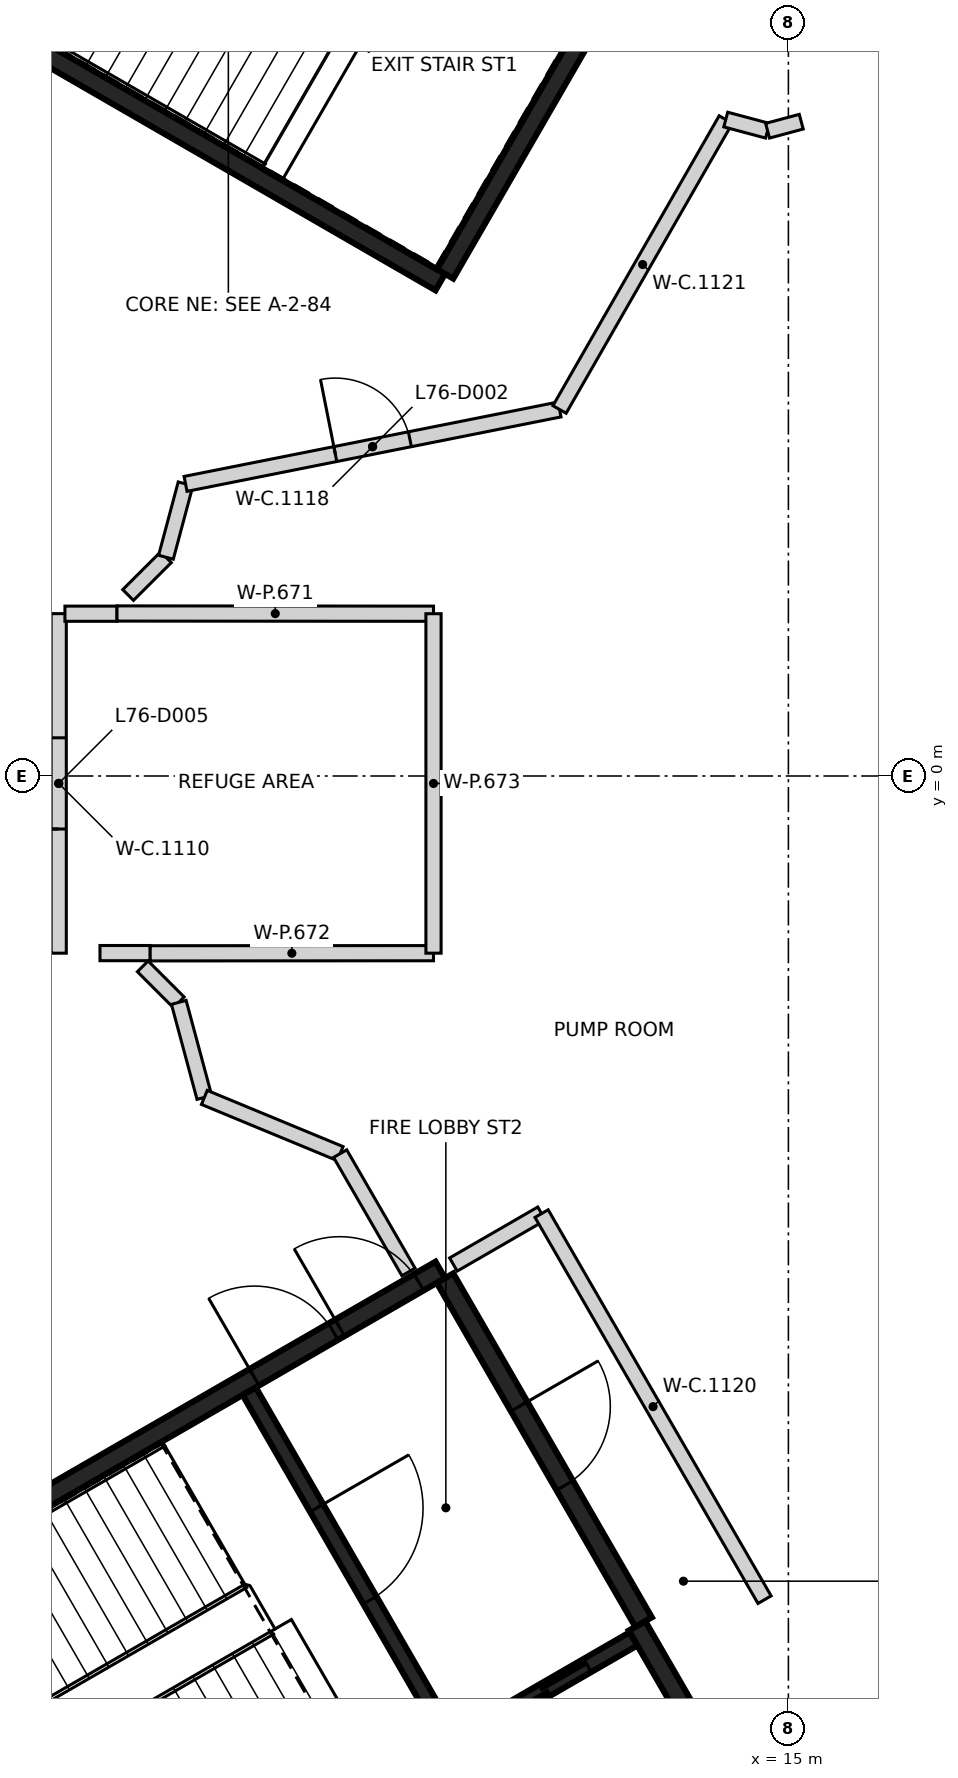
"""IFC4 building model, lengths in metres.
Left out: names, types, materials, properties, quantities, classifications, styles, units other than length and angle.
Written with IfcOpenShell. Run it as: python <this file> out.ifc"""

import sys

from ifc_helpers import new_model, si_unit, direction, frame, frame_2d, origin, place, context, subcontext, project, spatial, rectangle, extrude, element, fill, save


model = new_model("IFC4")
c1 = context("Model", 3, precision=1e-05, world=origin(), true_north=direction((0.0, 1.0)))
c2 = subcontext(c1, "Body", "Model", "MODEL_VIEW")
j1 = project(units=[si_unit("LENGTHUNIT", "METRE"), si_unit("PLANEANGLEUNIT", "RADIAN")], contexts=[c1])
p1 = place(None, origin())
s1 = spatial("IfcSite", under=j1, at=p1, CompositionType="ELEMENT")
p2 = place(p1, origin())
s2 = spatial("IfcBuilding", under=s1, at=p2, CompositionType="ELEMENT")
p3 = place(p2, frame((0.0, 0.0, 301.8)))
s3 = spatial("IfcBuildingStorey", under=s2, at=p3, CompositionType="ELEMENT", Elevation=301.8)
p4 = place(p3, frame((10.42, 6.498, 0.0), z_axis=(0.0, 0.0, 1.0), x_axis=(-0.866021906294, 0.500006057782, 0.0)))
e1 = element("IfcWall", 1, at=p4, inside=s3, PredefinedType="SHEAR", context=c2, shape_type="SweptSolid", body=[
    extrude(rectangle(XDim=11.55, YDim=0.25, at=frame_2d((5.775, 0.0))), origin(), (0.0, 0.0, 1.0), 4.45),
])
p5 = place(p4, frame((10.025, 0.0, 0.0)))
e2 = element("IfcOpeningElement", 2, at=p5, cuts=e1, PredefinedType="OPENING", context=c2, shape_type="SweptSolid", body=[
    extrude(rectangle(XDim=1.2, YDim=2.1, at=frame_2d((0.6, 1.05))), frame((0.0, 0.135, 0.0), z_axis=(0.0, -1.0, 0.0), x_axis=(1.0, 0.0, 0.0)), (0.0, 0.0, 1.0), 0.27),
])
p6 = place(p4, frame((8.725, 0.0, 0.0)))
e3 = element("IfcOpeningElement", 3, at=p6, cuts=e1, PredefinedType="OPENING", context=c2, shape_type="SweptSolid", body=[
    extrude(rectangle(XDim=1.2, YDim=2.1, at=frame_2d((0.6, 1.05))), frame((0.0, 0.135, 0.0), z_axis=(0.0, -1.0, 0.0), x_axis=(1.0, 0.0, 0.0)), (0.0, 0.0, 1.0), 0.27),
])
p7 = place(p3, frame((13.238, 11.378, 0.0), z_axis=(0.0, 0.0, 1.0), x_axis=(-0.500008851346, -0.866020293397, 0.0)))
e4 = element("IfcWall", 4, at=p7, inside=s3, PredefinedType="SHEAR", context=c2, shape_type="SweptSolid", body=[
    extrude(rectangle(XDim=5.51, YDim=0.25, at=frame_2d((2.755, 0.0))), origin(), (0.0, 0.0, 1.0), 4.45),
])
p8 = place(p3, frame((0.417, -12.273, 0.0), z_axis=(0.0, 0.0, 1.0), x_axis=(0.866021906294, 0.500006057782, 0.0)))
e5 = element("IfcWall", 5, at=p8, inside=s3, PredefinedType="SHEAR", context=c2, shape_type="SweptSolid", body=[
    extrude(rectangle(XDim=11.55, YDim=0.25, at=frame_2d((5.775, 0.0))), origin(), (0.0, 0.0, 1.0), 4.45),
])
p9 = place(p8, frame((10.025, 0.0, 0.0)))
e6 = element("IfcOpeningElement", 6, at=p9, cuts=e5, PredefinedType="OPENING", context=c2, shape_type="SweptSolid", body=[
    extrude(rectangle(XDim=1.2, YDim=2.1, at=frame_2d((0.6, 1.05))), frame((0.0, 0.135, 0.0), z_axis=(0.0, -1.0, 0.0), x_axis=(1.0, 0.0, 0.0)), (0.0, 0.0, 1.0), 0.27),
])
p10 = place(p8, frame((8.725, 0.0, 0.0)))
e7 = element("IfcOpeningElement", 7, at=p10, cuts=e5, PredefinedType="OPENING", context=c2, shape_type="SweptSolid", body=[
    extrude(rectangle(XDim=1.2, YDim=2.1, at=frame_2d((0.6, 1.05))), frame((0.0, 0.135, 0.0), z_axis=(0.0, -1.0, 0.0), x_axis=(1.0, 0.0, 0.0)), (0.0, 0.0, 1.0), 0.27),
])
p11 = place(p3, frame((13.008, -11.181, 0.0), z_axis=(0.0, 0.0, 1.0), x_axis=(0.500001955336, -0.866024274868, 0.0)))
e8 = element("IfcWall", 8, at=p11, inside=s3, PredefinedType="SHEAR", context=c2, shape_type="SweptSolid", body=[
    extrude(rectangle(XDim=6.125, YDim=0.25, at=frame_2d((3.062, 0.0))), origin(), (0.0, 0.0, 1.0), 4.45),
])
p12 = place(p11, frame((4.563, 0.0, 0.0)))
e9 = element("IfcOpeningElement", 9, at=p12, cuts=e8, PredefinedType="OPENING", context=c2, shape_type="SweptSolid", body=[
    extrude(rectangle(XDim=1.0, YDim=2.1, at=frame_2d((0.5, 1.05))), frame((0.0, 0.135, 0.0), z_axis=(0.0, -1.0, 0.0), x_axis=(1.0, 0.0, 0.0)), (0.0, 0.0, 1.0), 0.27),
])
p13 = place(p3, frame((10.483, -6.606, 0.0), z_axis=(0.0, 0.0, 1.0), x_axis=(0.49999885962, -0.866026062182, 0.0)))
e10 = element("IfcWall", 10, at=p13, inside=s3, PredefinedType="SHEAR", context=c2, shape_type="SweptSolid", body=[
    extrude(rectangle(XDim=5.225, YDim=0.25, at=frame_2d((2.612, 0.0))), origin(), (0.0, 0.0, 1.0), 4.45),
])
p14 = place(p13, frame((1.95, 0.0, 0.0)))
e11 = element("IfcOpeningElement", 11, at=p14, cuts=e10, PredefinedType="OPENING", context=c2, shape_type="SweptSolid", body=[
    extrude(rectangle(XDim=1.2, YDim=2.1, at=frame_2d((0.6, 1.05))), frame((0.0, 0.135, 0.0), z_axis=(0.0, -1.0, 0.0), x_axis=(1.0, 0.0, 0.0)), (0.0, 0.0, 1.0), 0.27),
])
p15 = place(p3, frame((7.906, -8.094, 0.0), z_axis=(0.0, 0.0, 1.0), x_axis=(0.500027839223, -0.866009330205, 0.0)))
e12 = element("IfcWall", 12, at=p15, inside=s3, PredefinedType="SHEAR", context=c2, shape_type="SweptSolid", body=[
    extrude(rectangle(XDim=5.098, YDim=0.2, at=frame_2d((2.549, 0.0))), origin(), (0.0, 0.0, 1.0), 4.45),
])
p16 = place(p15, frame((1.774, 0.0, 0.0)))
e13 = element("IfcOpeningElement", 13, at=p16, cuts=e12, PredefinedType="OPENING", context=c2, shape_type="SweptSolid", body=[
    extrude(rectangle(XDim=1.4, YDim=2.1, at=frame_2d((0.7, 1.05))), frame((0.0, 0.11, 0.0), z_axis=(0.0, -1.0, 0.0), x_axis=(1.0, 0.0, 0.0)), (0.0, 0.0, 1.0), 0.22),
])
p17 = place(p3, frame((10.666, -12.678, 0.0), z_axis=(0.0, 0.0, 1.0), x_axis=(0.866018407898, 0.500012117035, 0.0)))
e14 = element("IfcWall", 14, at=p17, inside=s3, PredefinedType="SHEAR", context=c2, shape_type="SweptSolid", body=[
    extrude(rectangle(XDim=2.651, YDim=0.2, at=frame_2d((1.325, 0.0))), origin(), (0.0, 0.0, 1.0), 4.45),
])
p18 = place(p17, frame((0.652, 0.0, 0.0)))
e15 = element("IfcOpeningElement", 15, at=p18, cuts=e14, PredefinedType="OPENING", context=c2, shape_type="SweptSolid", body=[
    extrude(rectangle(XDim=1.3, YDim=2.1, at=frame_2d((0.65, 1.05))), frame((0.0, 0.11, 0.0), z_axis=(0.0, -1.0, 0.0), x_axis=(1.0, 0.0, 0.0)), (0.0, 0.0, 1.0), 0.22),
])
p19 = place(p3, frame((5.4, -2.331, 0.0), z_axis=(0.0, 0.0, 1.0), x_axis=(0.0, 1.0, 0.0)))
e16 = element("IfcWall", 16, at=p19, inside=s3, PredefinedType="PARTITIONING", context=c2, shape_type="SweptSolid", body=[
    extrude(rectangle(XDim=4.467, YDim=0.2, at=frame_2d((2.233, 0.0))), origin(), (0.0, 0.0, 1.0), 4.45),
])
p20 = place(p19, frame((1.634, 0.0, 0.0)))
e17 = element("IfcOpeningElement", 17, at=p20, cuts=e16, PredefinedType="OPENING", context=c2, shape_type="SweptSolid", body=[
    extrude(rectangle(XDim=1.2, YDim=2.1, at=frame_2d((0.6, 1.05))), frame((0.0, 0.11, 0.0), z_axis=(0.0, -1.0, 0.0), x_axis=(1.0, 0.0, 0.0)), (0.0, 0.0, 1.0), 0.22),
])
p21 = place(p3, frame((5.482, 2.135, 0.0), z_axis=(0.0, 0.0, 1.0), x_axis=(1.0, 0.0, 0.0)))
e18 = element("IfcWall", 18, at=p21, inside=s3, PredefinedType="PARTITIONING", context=c2, shape_type="SweptSolid", body=[
    extrude(rectangle(XDim=0.685, YDim=0.2, at=frame_2d((0.343, 0.0))), origin(), (0.0, 0.0, 1.0), 4.45),
])
p22 = place(p3, frame((5.943, -2.33, 0.0), z_axis=(0.0, 0.0, 1.0), x_axis=(1.0, 0.0, 0.0)))
e19 = element("IfcWall", 19, at=p22, inside=s3, PredefinedType="PARTITIONING", context=c2, shape_type="SweptSolid", body=[
    extrude(rectangle(XDim=0.661, YDim=0.2, at=frame_2d((0.331, 0.0))), origin(), (0.0, 0.0, 1.0), 4.45),
])
p23 = place(p3, frame((6.313, 2.381, 0.0), z_axis=(0.0, 0.0, 1.0), x_axis=(0.707973863937, 0.706238633878, 0.0)))
e20 = element("IfcWall", 20, at=p23, inside=s3, PredefinedType="PARTITIONING", context=c2, shape_type="SweptSolid", body=[
    extrude(rectangle(XDim=0.703, YDim=0.2, at=frame_2d((0.352, 0.0))), origin(), (0.0, 0.0, 1.0), 4.45),
])
p24 = place(p3, frame((6.506, -2.504, 0.0), z_axis=(0.0, 0.0, 1.0), x_axis=(0.706924654529, -0.707288860946, 0.0)))
e21 = element("IfcWall", 21, at=p24, inside=s3, PredefinedType="PARTITIONING", context=c2, shape_type="SweptSolid", body=[
    extrude(rectangle(XDim=0.67, YDim=0.2, at=frame_2d((0.335, 0.0))), origin(), (0.0, 0.0, 1.0), 4.45),
])
p25 = place(p3, frame((6.811, 2.878, 0.0), z_axis=(0.0, 0.0, 1.0), x_axis=(0.258316655297, 0.966060301221, 0.0)))
e22 = element("IfcWall", 22, at=p25, inside=s3, PredefinedType="PARTITIONING", context=c2, shape_type="SweptSolid", body=[
    extrude(rectangle(XDim=0.999, YDim=0.2, at=frame_2d((0.5, 0.0))), origin(), (0.0, 0.0, 1.0), 4.45),
])
p26 = place(p3, frame((6.98, -2.978, 0.0), z_axis=(0.0, 0.0, 1.0), x_axis=(0.259797678908, -0.965663070659, 0.0)))
e23 = element("IfcWall", 23, at=p26, inside=s3, PredefinedType="PARTITIONING", context=c2, shape_type="SweptSolid", body=[
    extrude(rectangle(XDim=1.295, YDim=0.2, at=frame_2d((0.647, 0.0))), origin(), (0.0, 0.0, 1.0), 4.45),
])
p27 = place(p3, frame((7.316, -4.229, 0.0), z_axis=(0.0, 0.0, 1.0), x_axis=(0.923978372606, -0.382444724054, 0.0)))
e24 = element("IfcWall", 24, at=p27, inside=s3, PredefinedType="PARTITIONING", context=c2, shape_type="SweptSolid", body=[
    extrude(rectangle(XDim=1.934, YDim=0.2, at=frame_2d((0.967, 0.0))), origin(), (0.0, 0.0, 1.0), 4.45),
])
p28 = place(p3, frame((7.069, 3.843, 0.0), z_axis=(0.0, 0.0, 1.0), x_axis=(0.98077114194, 0.195161387415, 0.0)))
e25 = element("IfcWall", 25, at=p28, inside=s3, PredefinedType="PARTITIONING", context=c2, shape_type="SweptSolid", body=[
    extrude(rectangle(XDim=5.016, YDim=0.2, at=frame_2d((2.508, 0.0))), origin(), (0.0, 0.0, 1.0), 4.45),
])
p29 = place(p28, frame((2.009, 0.0, 0.0)))
e26 = element("IfcOpeningElement", 26, at=p29, cuts=e25, PredefinedType="OPENING", context=c2, shape_type="SweptSolid", body=[
    extrude(rectangle(XDim=1.0, YDim=2.1, at=frame_2d((0.5, 1.05))), frame((0.0, 0.11, 0.0), z_axis=(0.0, -1.0, 0.0), x_axis=(1.0, 0.0, 0.0)), (0.0, 0.0, 1.0), 0.22),
])
p30 = place(p3, frame((9.103, -4.968, 0.0), z_axis=(0.0, 0.0, 1.0), x_axis=(0.500008413725, -0.866020546064, 0.0)))
e27 = element("IfcWall", 27, at=p30, inside=s3, PredefinedType="PARTITIONING", context=c2, shape_type="SweptSolid", body=[
    extrude(rectangle(XDim=1.798, YDim=0.2, at=frame_2d((0.899, 0.0))), origin(), (0.0, 0.0, 1.0), 4.45),
])
p31 = place(p3, frame((10.593, -6.427, 0.0), z_axis=(0.0, 0.0, 1.0), x_axis=(0.865912429188, 0.500195626709, 0.0)))
e28 = element("IfcWall", 28, at=p31, inside=s3, PredefinedType="PARTITIONING", context=c2, shape_type="SweptSolid", body=[
    extrude(rectangle(XDim=1.34, YDim=0.2, at=frame_2d((0.67, 0.0))), origin(), (0.0, 0.0, 1.0), 4.45),
])
p32 = place(p3, frame((11.753, -5.757, 0.0), z_axis=(0.0, 0.0, 1.0), x_axis=(0.500118781305, -0.865956814504, 0.0)))
e29 = element("IfcWall", 29, at=p32, inside=s3, PredefinedType="PARTITIONING", context=c2, shape_type="SweptSolid", body=[
    extrude(rectangle(XDim=5.865, YDim=0.2, at=frame_2d((2.933, 0.0))), origin(), (0.0, 0.0, 1.0), 4.45),
])
p33 = place(p3, frame((11.989, 4.822, 0.0), z_axis=(0.0, 0.0, 1.0), x_axis=(0.497442063939, 0.867497200586, 0.0)))
e30 = element("IfcWall", 30, at=p33, inside=s3, PredefinedType="PARTITIONING", context=c2, shape_type="SweptSolid", body=[
    extrude(rectangle(XDim=4.396, YDim=0.2, at=frame_2d((2.198, 0.0))), origin(), (0.0, 0.0, 1.0), 4.45),
])
p34 = place(p3, frame((14.176, 8.636, 0.0), z_axis=(0.0, 0.0, 1.0), x_axis=(0.966106711255, -0.258143027153, 0.0)))
e31 = element("IfcWall", 31, at=p34, inside=s3, PredefinedType="PARTITIONING", context=c2, shape_type="SweptSolid", body=[
    extrude(rectangle(XDim=0.569, YDim=0.2, at=frame_2d((0.285, 0.0))), origin(), (0.0, 0.0, 1.0), 4.45),
])
p35 = place(p3, frame((14.726, 8.489, 0.0), z_axis=(0.0, 0.0, 1.0), x_axis=(0.965800573938, 0.259286041625, 0.0)))
e32 = element("IfcWall", 32, at=p35, inside=s3, PredefinedType="PARTITIONING", context=c2, shape_type="SweptSolid", body=[
    extrude(rectangle(XDim=0.458, YDim=0.2, at=frame_2d((0.229, 0.0))), origin(), (0.0, 0.0, 1.0), 4.45),
])
p36 = place(p3, frame((6.167, 2.138, 0.0), z_axis=(0.0, 0.0, 1.0), x_axis=(0.999999752498, -0.000703564554, 0.0)))
e33 = element("IfcWall", 33, at=p36, inside=s3, PredefinedType="PARTITIONING", context=c2, shape_type="SweptSolid", body=[
    extrude(rectangle(XDim=4.164, YDim=0.2, at=frame_2d((2.082, 0.0))), origin(), (0.0, 0.0, 1.0), 4.45),
])
p37 = place(p3, frame((6.604, -2.333, 0.0), z_axis=(0.0, 0.0, 1.0), x_axis=(0.999999894873, 0.000458535259, 0.0)))
e34 = element("IfcWall", 34, at=p37, inside=s3, PredefinedType="PARTITIONING", context=c2, shape_type="SweptSolid", body=[
    extrude(rectangle(XDim=3.727, YDim=0.2, at=frame_2d((1.864, 0.0))), origin(), (0.0, 0.0, 1.0), 4.45),
])
p38 = place(p3, frame((10.331, -2.331, 0.0), z_axis=(0.0, 0.0, 1.0), x_axis=(0.0, 1.0, 0.0)))
e35 = element("IfcWall", 35, at=p38, inside=s3, PredefinedType="PARTITIONING", context=c2, shape_type="SweptSolid", body=[
    extrude(rectangle(XDim=4.466, YDim=0.2, at=frame_2d((2.233, 0.0))), origin(), (0.0, 0.0, 1.0), 4.45),
])
p39 = place(p18, origin())
e36 = element("IfcDoor", 36, at=p39, inside=s3, OperationType="SLIDING_TO_LEFT", PredefinedType="DOOR", context=c2, shape_type="SweptSolid", body=[
    extrude(rectangle(XDim=1.3, YDim=2.1, at=frame_2d((0.65, 1.05))), frame((0.0, 0.025, 0.0), z_axis=(0.0, -1.0, 0.0), x_axis=(1.0, 0.0, 0.0)), (0.0, 0.0, 1.0), 0.05),
])
fill(e15, e36)
p40 = place(p9, origin())
e37 = element("IfcDoor", 37, at=p40, inside=s3, OperationType="SINGLE_SWING_LEFT", PredefinedType="DOOR", context=c2, shape_type="SweptSolid", body=[
    extrude(rectangle(XDim=1.2, YDim=2.1, at=frame_2d((0.6, 1.05))), frame((0.0, 0.025, 0.0), z_axis=(0.0, -1.0, 0.0), x_axis=(1.0, 0.0, 0.0)), (0.0, 0.0, 1.0), 0.05),
])
fill(e6, e37)
p41 = place(p10, origin())
e38 = element("IfcDoor", 38, at=p41, inside=s3, OperationType="SINGLE_SWING_RIGHT", PredefinedType="DOOR", context=c2, shape_type="SweptSolid", body=[
    extrude(rectangle(XDim=1.2, YDim=2.1, at=frame_2d((0.6, 1.05))), frame((0.0, 0.025, 0.0), z_axis=(0.0, -1.0, 0.0), x_axis=(1.0, 0.0, 0.0)), (0.0, 0.0, 1.0), 0.05),
])
fill(e7, e38)
p42 = place(p16, origin())
e39 = element("IfcDoor", 39, at=p42, inside=s3, OperationType="SINGLE_SWING_LEFT", PredefinedType="DOOR", context=c2, shape_type="SweptSolid", body=[
    extrude(rectangle(XDim=1.4, YDim=2.1, at=frame_2d((0.7, 1.05))), frame((0.0, 0.025, 0.0), z_axis=(0.0, -1.0, 0.0), x_axis=(1.0, 0.0, 0.0)), (0.0, 0.0, 1.0), 0.05),
])
fill(e13, e39)
p43 = place(p14, origin())
e40 = element("IfcDoor", 40, at=p43, inside=s3, OperationType="SINGLE_SWING_RIGHT", PredefinedType="DOOR", context=c2, shape_type="SweptSolid", body=[
    extrude(rectangle(XDim=1.2, YDim=2.1, at=frame_2d((0.6, 1.05))), frame((0.0, 0.025, 0.0), z_axis=(0.0, -1.0, 0.0), x_axis=(1.0, 0.0, 0.0)), (0.0, 0.0, 1.0), 0.05),
])
fill(e11, e40)
p44 = place(p29, frame((1.0, 0.0, 0.0), z_axis=(0.0, 0.0, 1.0), x_axis=(-1.0, 0.0, 0.0)))
e41 = element("IfcDoor", 41, at=p44, inside=s3, OperationType="SINGLE_SWING_LEFT", PredefinedType="DOOR", context=c2, shape_type="SweptSolid", body=[
    extrude(rectangle(XDim=1.0, YDim=2.1, at=frame_2d((0.5, 1.05))), frame((0.0, 0.025, 0.0), z_axis=(0.0, -1.0, 0.0), x_axis=(1.0, 0.0, 0.0)), (0.0, 0.0, 1.0), 0.05),
])
fill(e26, e41)
p45 = place(p20, frame((1.2, 0.0, 0.0), z_axis=(0.0, 0.0, 1.0), x_axis=(-1.0, 0.0, 0.0)))
e42 = element("IfcDoor", 42, at=p45, inside=s3, OperationType="SINGLE_SWING_LEFT", PredefinedType="DOOR", context=c2, shape_type="SweptSolid", body=[
    extrude(rectangle(XDim=1.2, YDim=2.1, at=frame_2d((0.6, 1.05))), frame((0.0, 0.025, 0.0), z_axis=(0.0, -1.0, 0.0), x_axis=(1.0, 0.0, 0.0)), (0.0, 0.0, 1.0), 0.05),
])
fill(e17, e42)
save(model, sys.argv[1])
